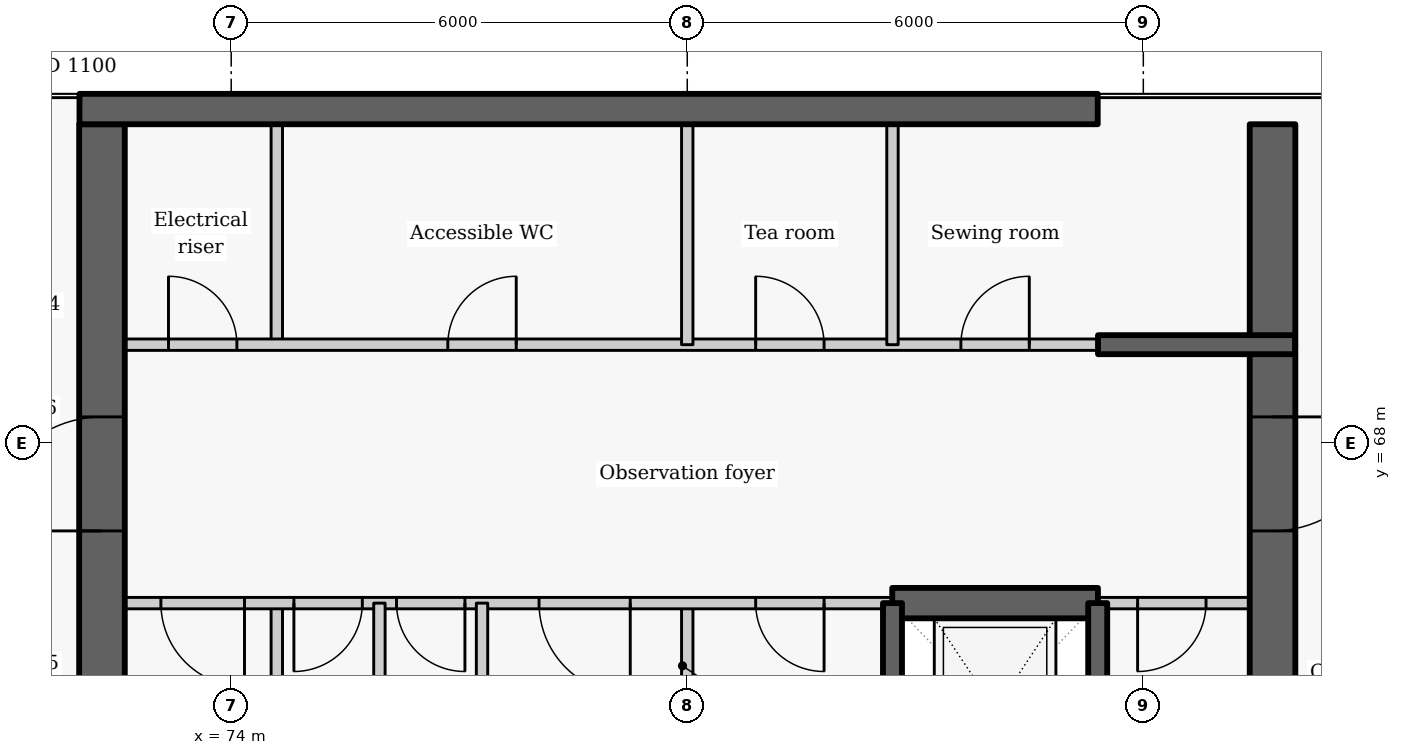
"""IFC4 building model, lengths in metres.
Left out: names, types, materials, properties, quantities, classifications, styles, units other than length and angle.
Written with IfcOpenShell. Run it as: python <this file> out.ifc"""

import sys

from ifc_helpers import new_model, si_unit, direction, frame, frame_2d, origin, place, context, subcontext, project, spatial, rectangle, extrude, element, fill, save


model = new_model("IFC4")
c1 = context("Model", 3, precision=1e-05, world=origin(), true_north=direction((0.0, 1.0)))
c2 = subcontext(c1, "Body", "Model", "MODEL_VIEW")
j1 = project(units=[si_unit("LENGTHUNIT", "METRE"), si_unit("PLANEANGLEUNIT", "RADIAN")], contexts=[c1])
p1 = place(None, origin())
s1 = spatial("IfcSite", under=j1, at=p1, CompositionType="ELEMENT")
p2 = place(p1, origin())
s2 = spatial("IfcBuilding", under=s1, at=p2, CompositionType="ELEMENT")
p3 = place(p2, frame((0.0, 0.0, 286.8)))
s3 = spatial("IfcBuildingStorey", under=s2, at=p3, CompositionType="ELEMENT", Elevation=286.8)
p4 = place(p3, frame((74.6, 63.1, 0.0), z_axis=(0.0, 0.0, 1.0), x_axis=(0.0, 1.0, 0.0)))
e1 = element("IfcWall", 1, at=p4, inside=s3, PredefinedType="PARTITIONING", context=c2, shape_type="SweptSolid", body=[
    extrude(rectangle(XDim=2.8, YDim=0.15, at=frame_2d((1.4, 0.0))), origin(), (0.0, 0.0, 1.0), 3.325),
])
p5 = place(p3, frame((74.6, 69.3, 0.0), z_axis=(0.0, 0.0, 1.0), x_axis=(0.0, 1.0, 0.0)))
e2 = element("IfcWall", 2, at=p5, inside=s3, PredefinedType="PARTITIONING", context=c2, shape_type="SweptSolid", body=[
    extrude(rectangle(XDim=2.9, YDim=0.15, at=frame_2d((1.45, 0.0))), origin(), (0.0, 0.0, 1.0), 3.325),
])
p6 = place(p3, frame((72.0, 69.3, 0.0), z_axis=(0.0, 0.0, 1.0), x_axis=(1.0, 0.0, 0.0)))
e3 = element("IfcWall", 3, at=p6, inside=s3, PredefinedType="PARTITIONING", context=c2, shape_type="SweptSolid", body=[
    extrude(rectangle(XDim=13.4, YDim=0.15, at=frame_2d((6.7, 0.0))), origin(), (0.0, 0.0, 1.0), 3.325),
])
p7 = place(p6, frame((1.175, 0.0, 0.0)))
e4 = element("IfcOpeningElement", 4, at=p7, cuts=e3, PredefinedType="OPENING", context=c2, shape_type="SweptSolid", body=[
    extrude(rectangle(XDim=0.9, YDim=2.1, at=frame_2d((0.45, 1.05))), frame((0.0, 0.085, 0.0), z_axis=(0.0, -1.0, 0.0), x_axis=(1.0, 0.0, 0.0)), (0.0, 0.0, 1.0), 0.17),
])
p8 = place(p6, frame((4.85, 0.0, 0.0)))
e5 = element("IfcOpeningElement", 5, at=p8, cuts=e3, PredefinedType="OPENING", context=c2, shape_type="SweptSolid", body=[
    extrude(rectangle(XDim=0.9, YDim=2.1, at=frame_2d((0.45, 1.05))), frame((0.0, 0.085, 0.0), z_axis=(0.0, -1.0, 0.0), x_axis=(1.0, 0.0, 0.0)), (0.0, 0.0, 1.0), 0.17),
])
p9 = place(p6, frame((8.9, 0.0, 0.0)))
e6 = element("IfcOpeningElement", 6, at=p9, cuts=e3, PredefinedType="OPENING", context=c2, shape_type="SweptSolid", body=[
    extrude(rectangle(XDim=0.9, YDim=2.1, at=frame_2d((0.45, 1.05))), frame((0.0, 0.085, 0.0), z_axis=(0.0, -1.0, 0.0), x_axis=(1.0, 0.0, 0.0)), (0.0, 0.0, 1.0), 0.17),
])
p10 = place(p6, frame((11.6, 0.0, 0.0)))
e7 = element("IfcOpeningElement", 7, at=p10, cuts=e3, PredefinedType="OPENING", context=c2, shape_type="SweptSolid", body=[
    extrude(rectangle(XDim=0.9, YDim=2.1, at=frame_2d((0.45, 1.05))), frame((0.0, 0.085, 0.0), z_axis=(0.0, -1.0, 0.0), x_axis=(1.0, 0.0, 0.0)), (0.0, 0.0, 1.0), 0.17),
])
p11 = place(p3, frame((72.3, 63.1, -0.275), z_axis=(0.0, 0.0, 1.0), x_axis=(0.0, 1.0, 0.0)))
e8 = element("IfcWall", 8, at=p11, inside=s3, PredefinedType="SHEAR", context=c2, shape_type="SweptSolid", body=[
    extrude(rectangle(XDim=9.1, YDim=0.6, at=frame_2d((4.55, 0.0))), origin(), (0.0, 0.0, 1.0), 3.6),
])
p12 = place(p11, frame((3.75, 0.0, 0.275)))
e9 = element("IfcOpeningElement", 9, at=p12, cuts=e8, PredefinedType="OPENING", context=c2, shape_type="SweptSolid", body=[
    extrude(rectangle(XDim=1.5, YDim=2.1, at=frame_2d((0.75, 1.05))), frame((0.0, 0.31, 0.0), z_axis=(0.0, -1.0, 0.0), x_axis=(1.0, 0.0, 0.0)), (0.0, 0.0, 1.0), 0.62),
])
p13 = place(p3, frame((80.0, 63.1, 0.0), z_axis=(0.0, 0.0, 1.0), x_axis=(0.0, 1.0, 0.0)))
e10 = element("IfcWall", 10, at=p13, inside=s3, PredefinedType="PARTITIONING", context=c2, shape_type="SweptSolid", body=[
    extrude(rectangle(XDim=2.8, YDim=0.15, at=frame_2d((1.4, 0.0))), origin(), (0.0, 0.0, 1.0), 3.325),
])
for number, where, z_axis, x_axis in (
    (11, (80.0, 69.3, 0.0), (0.0, 0.0, 1.0), (0.0, 1.0, 0.0)),
    (12, (82.7, 69.3, 0.0), (0.0, 0.0, 1.0), (0.0, 1.0, 0.0)),
):
    element("IfcWall", number, at=place(p3, frame(where, z_axis=z_axis, x_axis=x_axis)), inside=s3, PredefinedType="PARTITIONING", context=c2, shape_type="SweptSolid", body=[
        extrude(rectangle(XDim=2.9, YDim=0.15, at=frame_2d((1.45, 0.0))), origin(), (0.0, 0.0, 1.0), 3.325),
    ])
p14 = place(p3, frame((82.703, 65.9, 0.0), z_axis=(0.0, 0.0, 1.0), x_axis=(-1.0, 0.0, 0.0)))
e13 = element("IfcWall", 13, at=p14, inside=s3, PredefinedType="PARTITIONING", context=c2, shape_type="SweptSolid", body=[
    extrude(rectangle(XDim=10.703, YDim=0.15, at=frame_2d((5.352, 0.0))), origin(), (0.0, 0.0, 1.0), 3.325),
])
p15 = place(p14, frame((8.528, 0.0, 0.0)))
e14 = element("IfcOpeningElement", 14, at=p15, cuts=e13, PredefinedType="OPENING", context=c2, shape_type="SweptSolid", body=[
    extrude(rectangle(XDim=1.1, YDim=2.1, at=frame_2d((0.55, 1.05))), frame((0.0, 0.085, 0.0), z_axis=(0.0, -1.0, 0.0), x_axis=(1.0, 0.0, 0.0)), (0.0, 0.0, 1.0), 0.17),
])
p16 = place(p14, frame((6.978, 0.0, 0.0)))
e15 = element("IfcOpeningElement", 15, at=p16, cuts=e13, PredefinedType="OPENING", context=c2, shape_type="SweptSolid", body=[
    extrude(rectangle(XDim=0.9, YDim=2.1, at=frame_2d((0.45, 1.05))), frame((0.0, 0.085, 0.0), z_axis=(0.0, -1.0, 0.0), x_axis=(1.0, 0.0, 0.0)), (0.0, 0.0, 1.0), 0.17),
])
p17 = place(p14, frame((5.628, 0.0, 0.0)))
e16 = element("IfcOpeningElement", 16, at=p17, cuts=e13, PredefinedType="OPENING", context=c2, shape_type="SweptSolid", body=[
    extrude(rectangle(XDim=0.9, YDim=2.1, at=frame_2d((0.45, 1.05))), frame((0.0, 0.085, 0.0), z_axis=(0.0, -1.0, 0.0), x_axis=(1.0, 0.0, 0.0)), (0.0, 0.0, 1.0), 0.17),
])
p18 = place(p14, frame((3.453, 0.0, 0.0)))
e17 = element("IfcOpeningElement", 17, at=p18, cuts=e13, PredefinedType="OPENING", context=c2, shape_type="SweptSolid", body=[
    extrude(rectangle(XDim=1.2, YDim=2.1, at=frame_2d((0.6, 1.05))), frame((0.0, 0.085, 0.0), z_axis=(0.0, -1.0, 0.0), x_axis=(1.0, 0.0, 0.0)), (0.0, 0.0, 1.0), 0.17),
])
p19 = place(p14, frame((0.903, 0.0, 0.0)))
e18 = element("IfcOpeningElement", 18, at=p19, cuts=e13, PredefinedType="OPENING", context=c2, shape_type="SweptSolid", body=[
    extrude(rectangle(XDim=0.9, YDim=2.1, at=frame_2d((0.45, 1.05))), frame((0.0, 0.085, 0.0), z_axis=(0.0, -1.0, 0.0), x_axis=(1.0, 0.0, 0.0)), (0.0, 0.0, 1.0), 0.17),
])
p20 = place(p3, frame((88.0, 65.9, 0.0), z_axis=(0.0, 0.0, 1.0), x_axis=(-1.0, 0.0, 0.0)))
e19 = element("IfcWall", 19, at=p20, inside=s3, PredefinedType="PARTITIONING", context=c2, shape_type="SweptSolid", body=[
    extrude(rectangle(XDim=2.603, YDim=0.15, at=frame_2d((1.302, 0.0))), origin(), (0.0, 0.0, 1.0), 3.325),
])
p21 = place(p20, frame((1.175, 0.0, 0.0)))
e20 = element("IfcOpeningElement", 20, at=p21, cuts=e19, PredefinedType="OPENING", context=c2, shape_type="SweptSolid", body=[
    extrude(rectangle(XDim=0.9, YDim=2.1, at=frame_2d((0.45, 1.05))), frame((0.0, 0.085, 0.0), z_axis=(0.0, -1.0, 0.0), x_axis=(1.0, 0.0, 0.0)), (0.0, 0.0, 1.0), 0.17),
])
p22 = place(p3, frame((82.697, 65.9, -0.275), z_axis=(0.0, 0.0, 1.0), x_axis=(1.0, 0.0, 0.0)))
e21 = element("IfcWall", 21, at=p22, inside=s3, PredefinedType="SHEAR", context=c2, shape_type="SweptSolid", body=[
    extrude(rectangle(XDim=2.706, YDim=0.4, at=frame_2d((1.353, 0.0))), origin(), (0.0, 0.0, 1.0), 3.6),
])
p23 = place(p3, frame((87.7, 69.3, -0.275), z_axis=(0.0, 0.0, 1.0), x_axis=(0.0, -1.0, 0.0)))
e22 = element("IfcWall", 22, at=p23, inside=s3, PredefinedType="SHEAR", context=c2, shape_type="SweptSolid", body=[
    extrude(rectangle(XDim=11.35, YDim=0.6, at=frame_2d((5.675, 0.0))), origin(), (0.0, 0.0, 1.0), 3.6),
])
p24 = place(p23, frame((0.95, 0.0, 0.275)))
e23 = element("IfcOpeningElement", 23, at=p24, cuts=e22, PredefinedType="OPENING", context=c2, shape_type="SweptSolid", body=[
    extrude(rectangle(XDim=1.5, YDim=2.1, at=frame_2d((0.75, 1.05))), frame((0.0, 0.31, 0.0), z_axis=(0.0, -1.0, 0.0), x_axis=(1.0, 0.0, 0.0)), (0.0, 0.0, 1.0), 0.62),
])
p25 = place(p23, frame((8.225, 0.0, 0.275)))
e24 = element("IfcOpeningElement", 24, at=p25, cuts=e22, PredefinedType="OPENING", context=c2, shape_type="SweptSolid", body=[
    extrude(rectangle(XDim=1.1, YDim=2.1, at=frame_2d((0.55, 1.05))), frame((0.0, 0.31, 0.0), z_axis=(0.0, -1.0, 0.0), x_axis=(1.0, 0.0, 0.0)), (0.0, 0.0, 1.0), 0.62),
])
for number, where, z_axis, x_axis in (
    (25, (75.95, 63.1, 0.0), (0.0, 0.0, 1.0), (0.0, 1.0, 0.0)),
    (26, (77.3, 63.1, 0.0), (0.0, 0.0, 1.0), (0.0, 1.0, 0.0)),
):
    element("IfcWall", number, at=place(p3, frame(where, z_axis=z_axis, x_axis=x_axis)), inside=s3, PredefinedType="PARTITIONING", context=c2, shape_type="SweptSolid", body=[
        extrude(rectangle(XDim=2.8, YDim=0.15, at=frame_2d((1.4, 0.0))), origin(), (0.0, 0.0, 1.0), 3.325),
    ])
for number, where, z_axis, x_axis in (
    (27, (82.7, 63.1, -0.275), (0.0, 0.0, 1.0), (0.0, 1.0, 0.0)),
    (28, (85.4, 63.1, -0.275), (0.0, 0.0, 1.0), (0.0, 1.0, 0.0)),
):
    element("IfcWall", number, at=place(p3, frame(where, z_axis=z_axis, x_axis=x_axis)), inside=s3, PredefinedType="SHEAR", context=c2, shape_type="SweptSolid", body=[
        extrude(rectangle(XDim=2.8, YDim=0.25, at=frame_2d((1.4, 0.0))), origin(), (0.0, 0.0, 1.0), 3.6),
    ])
p26 = place(p3, frame((72.004, 72.4, -0.275), z_axis=(0.0, 0.0, 1.0), x_axis=(1.0, 0.0, 0.0)))
e29 = element("IfcWall", 29, at=p26, inside=s3, PredefinedType="SHEAR", context=c2, shape_type="SweptSolid", body=[
    extrude(rectangle(XDim=13.396, YDim=0.4, at=frame_2d((6.698, 0.0))), origin(), (0.0, 0.0, 1.0), 3.6),
])
p27 = place(p3, frame((87.7, 69.304, -0.275), z_axis=(0.0, 0.0, 1.0), x_axis=(0.0, 1.0, 0.0)))
e30 = element("IfcWall", 30, at=p27, inside=s3, PredefinedType="SHEAR", context=c2, shape_type="SweptSolid", body=[
    extrude(rectangle(XDim=2.896, YDim=0.6, at=frame_2d((1.448, 0.0))), origin(), (0.0, 0.0, 1.0), 3.6),
])
p28 = place(p3, frame((85.404, 69.3, -0.275), z_axis=(0.0, 0.0, 1.0), x_axis=(1.0, 0.0, 0.0)))
e31 = element("IfcWall", 31, at=p28, inside=s3, PredefinedType="SHEAR", context=c2, shape_type="SweptSolid", body=[
    extrude(rectangle(XDim=2.592, YDim=0.25, at=frame_2d((1.296, 0.0))), origin(), (0.0, 0.0, 1.0), 3.6),
])
p29 = place(p7, origin())
e32 = element("IfcDoor", 32, at=p29, inside=s3, OperationType="SINGLE_SWING_LEFT", PredefinedType="DOOR", context=c2, shape_type="SweptSolid", body=[
    extrude(rectangle(XDim=0.9, YDim=2.1, at=frame_2d((0.45, 1.05))), frame((0.0, 0.025, 0.0), z_axis=(0.0, -1.0, 0.0), x_axis=(1.0, 0.0, 0.0)), (0.0, 0.0, 1.0), 0.05),
])
fill(e4, e32)
p30 = place(p8, origin())
e33 = element("IfcDoor", 33, at=p30, inside=s3, OperationType="SINGLE_SWING_RIGHT", PredefinedType="DOOR", context=c2, shape_type="SweptSolid", body=[
    extrude(rectangle(XDim=0.9, YDim=2.1, at=frame_2d((0.45, 1.05))), frame((0.0, 0.025, 0.0), z_axis=(0.0, -1.0, 0.0), x_axis=(1.0, 0.0, 0.0)), (0.0, 0.0, 1.0), 0.05),
])
fill(e5, e33)
p31 = place(p9, origin())
e34 = element("IfcDoor", 34, at=p31, inside=s3, OperationType="SINGLE_SWING_LEFT", PredefinedType="DOOR", context=c2, shape_type="SweptSolid", body=[
    extrude(rectangle(XDim=0.9, YDim=2.1, at=frame_2d((0.45, 1.05))), frame((0.0, 0.025, 0.0), z_axis=(0.0, -1.0, 0.0), x_axis=(1.0, 0.0, 0.0)), (0.0, 0.0, 1.0), 0.05),
])
fill(e6, e34)
p32 = place(p10, origin())
e35 = element("IfcDoor", 35, at=p32, inside=s3, OperationType="SINGLE_SWING_RIGHT", PredefinedType="DOOR", context=c2, shape_type="SweptSolid", body=[
    extrude(rectangle(XDim=0.9, YDim=2.1, at=frame_2d((0.45, 1.05))), frame((0.0, 0.025, 0.0), z_axis=(0.0, -1.0, 0.0), x_axis=(1.0, 0.0, 0.0)), (0.0, 0.0, 1.0), 0.05),
])
fill(e7, e35)
p33 = place(p15, origin())
e36 = element("IfcDoor", 36, at=p33, inside=s3, OperationType="SINGLE_SWING_LEFT", PredefinedType="DOOR", context=c2, shape_type="SweptSolid", body=[
    extrude(rectangle(XDim=1.1, YDim=2.1, at=frame_2d((0.55, 1.05))), frame((0.0, 0.025, 0.0), z_axis=(0.0, -1.0, 0.0), x_axis=(1.0, 0.0, 0.0)), (0.0, 0.0, 1.0), 0.05),
])
fill(e14, e36)
p34 = place(p16, origin())
e37 = element("IfcDoor", 37, at=p34, inside=s3, OperationType="SINGLE_SWING_RIGHT", PredefinedType="DOOR", context=c2, shape_type="SweptSolid", body=[
    extrude(rectangle(XDim=0.9, YDim=2.1, at=frame_2d((0.45, 1.05))), frame((0.0, 0.025, 0.0), z_axis=(0.0, -1.0, 0.0), x_axis=(1.0, 0.0, 0.0)), (0.0, 0.0, 1.0), 0.05),
])
fill(e15, e37)
p35 = place(p17, origin())
e38 = element("IfcDoor", 38, at=p35, inside=s3, OperationType="SINGLE_SWING_LEFT", PredefinedType="DOOR", context=c2, shape_type="SweptSolid", body=[
    extrude(rectangle(XDim=0.9, YDim=2.1, at=frame_2d((0.45, 1.05))), frame((0.0, 0.025, 0.0), z_axis=(0.0, -1.0, 0.0), x_axis=(1.0, 0.0, 0.0)), (0.0, 0.0, 1.0), 0.05),
])
fill(e16, e38)
p36 = place(p18, origin())
e39 = element("IfcDoor", 39, at=p36, inside=s3, OperationType="DOUBLE_DOOR_SINGLE_SWING", PredefinedType="DOOR", context=c2, shape_type="SweptSolid", body=[
    extrude(rectangle(XDim=1.2, YDim=2.1, at=frame_2d((0.6, 1.05))), frame((0.0, 0.025, 0.0), z_axis=(0.0, -1.0, 0.0), x_axis=(1.0, 0.0, 0.0)), (0.0, 0.0, 1.0), 0.05),
])
fill(e17, e39)
p37 = place(p19, origin())
e40 = element("IfcDoor", 40, at=p37, inside=s3, OperationType="SINGLE_SWING_LEFT", PredefinedType="DOOR", context=c2, shape_type="SweptSolid", body=[
    extrude(rectangle(XDim=0.9, YDim=2.1, at=frame_2d((0.45, 1.05))), frame((0.0, 0.025, 0.0), z_axis=(0.0, -1.0, 0.0), x_axis=(1.0, 0.0, 0.0)), (0.0, 0.0, 1.0), 0.05),
])
fill(e18, e40)
p38 = place(p21, origin())
e41 = element("IfcDoor", 41, at=p38, inside=s3, OperationType="SINGLE_SWING_RIGHT", PredefinedType="DOOR", context=c2, shape_type="SweptSolid", body=[
    extrude(rectangle(XDim=0.9, YDim=2.1, at=frame_2d((0.45, 1.05))), frame((0.0, 0.025, 0.0), z_axis=(0.0, -1.0, 0.0), x_axis=(1.0, 0.0, 0.0)), (0.0, 0.0, 1.0), 0.05),
])
fill(e20, e41)
p39 = place(p24, origin())
e42 = element("IfcDoor", 42, at=p39, inside=s3, OperationType="DOUBLE_DOOR_SINGLE_SWING", PredefinedType="DOOR", context=c2, shape_type="SweptSolid", body=[
    extrude(rectangle(XDim=1.5, YDim=2.1, at=frame_2d((0.75, 1.05))), frame((0.0, 0.025, 0.0), z_axis=(0.0, -1.0, 0.0), x_axis=(1.0, 0.0, 0.0)), (0.0, 0.0, 1.0), 0.05),
])
fill(e23, e42)
p40 = place(p12, origin())
e43 = element("IfcDoor", 43, at=p40, inside=s3, OperationType="DOUBLE_DOOR_SINGLE_SWING", PredefinedType="DOOR", context=c2, shape_type="SweptSolid", body=[
    extrude(rectangle(XDim=1.5, YDim=2.1, at=frame_2d((0.75, 1.05))), frame((0.0, 0.025, 0.0), z_axis=(0.0, -1.0, 0.0), x_axis=(1.0, 0.0, 0.0)), (0.0, 0.0, 1.0), 0.05),
])
fill(e9, e43)
save(model, sys.argv[1])
